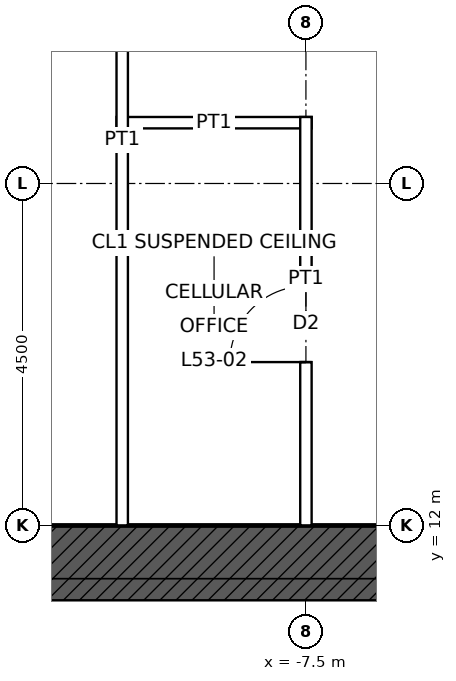
"""IFC4 building model, lengths in metres.
Left out: names, types, materials, properties, quantities, classifications, styles, units other than length and angle.
Written with IfcOpenShell. Run it as: python <this file> out.ifc"""

import sys

from ifc_helpers import new_model, si_unit, direction, frame, frame_2d, origin, place, context, subcontext, project, spatial, rectangle, extrude, element, fill, save


model = new_model("IFC4")
c1 = context("Model", 3, precision=1e-05, world=origin(), true_north=direction((0.0, 1.0)))
c2 = subcontext(c1, "Body", "Model", "MODEL_VIEW")
j1 = project(units=[si_unit("LENGTHUNIT", "METRE"), si_unit("PLANEANGLEUNIT", "RADIAN")], contexts=[c1])
p1 = place(None, origin())
s1 = spatial("IfcSite", under=j1, at=p1, CompositionType="ELEMENT")
p2 = place(p1, origin())
s2 = spatial("IfcBuilding", under=s1, at=p2, CompositionType="ELEMENT")
p3 = place(p2, frame((0.0, 0.0, 245.9)))
s3 = spatial("IfcBuildingStorey", under=s2, at=p3, CompositionType="ELEMENT", Elevation=245.9)
p4 = place(p3, frame((-12.0, 11.5, 0.0), z_axis=(0.0, 0.0, 1.0), x_axis=(1.0, 0.0, 0.0)))
e1 = element("IfcWall", 1, at=p4, inside=s3, PredefinedType="SHEAR", context=c2, shape_type="SweptSolid", body=[
    extrude(rectangle(XDim=24.0, YDim=1.0, at=frame_2d((12.0, 0.0))), origin(), (0.0, 0.0, 1.0), 4.0),
])
p5 = place(p4, frame((6.25, 0.0, 0.0)))
e2 = element("IfcOpeningElement", 2, at=p5, cuts=e1, PredefinedType="OPENING", context=c2, shape_type="SweptSolid", body=[
    extrude(rectangle(XDim=1.0, YDim=2.4, at=frame_2d((0.5, 1.2))), frame((0.0, 0.51, 0.0), z_axis=(0.0, -1.0, 0.0), x_axis=(1.0, 0.0, 0.0)), (0.0, 0.0, 1.0), 1.02),
])
p6 = place(p4, frame((16.75, 0.0, 0.0)))
e3 = element("IfcOpeningElement", 3, at=p6, cuts=e1, PredefinedType="OPENING", context=c2, shape_type="SweptSolid", body=[
    extrude(rectangle(XDim=1.0, YDim=2.4, at=frame_2d((0.5, 1.2))), frame((0.0, 0.51, 0.0), z_axis=(0.0, -1.0, 0.0), x_axis=(1.0, 0.0, 0.0)), (0.0, 0.0, 1.0), 1.02),
])
p7 = place(p3, frame((-9.992, 17.3, 0.0), z_axis=(0.0, 0.0, 1.0), x_axis=(1.0, 0.0, 0.0)))
e4 = element("IfcWall", 4, at=p7, inside=s3, PredefinedType="PARTITIONING", context=c2, shape_type="SweptSolid", body=[
    extrude(rectangle(XDim=2.567, YDim=0.15, at=frame_2d((1.283, 0.0))), origin(), (0.0, 0.0, 1.0), 3.85),
])
p8 = place(p3, frame((-9.917, 12.0, 0.0), z_axis=(0.0, 0.0, 1.0), x_axis=(0.0, 1.0, 0.0)))
e5 = element("IfcWall", 5, at=p8, inside=s3, PredefinedType="PARTITIONING", context=c2, shape_type="SweptSolid", body=[
    extrude(rectangle(XDim=10.15, YDim=0.15, at=frame_2d((5.075, 0.0))), origin(), (0.0, 0.0, 1.0), 3.85),
])
p9 = place(p3, frame((-7.5, 12.0, 0.0), z_axis=(0.0, 0.0, 1.0), x_axis=(0.0, 1.0, 0.0)))
e6 = element("IfcWall", 6, at=p9, inside=s3, PredefinedType="PARTITIONING", context=c2, shape_type="SweptSolid", body=[
    extrude(rectangle(XDim=5.375, YDim=0.15, at=frame_2d((2.688, 0.0))), origin(), (0.0, 0.0, 1.0), 3.238),
])
p10 = place(p9, frame((2.15, 0.0, 0.0)))
e7 = element("IfcOpeningElement", 7, at=p10, cuts=e6, PredefinedType="OPENING", context=c2, shape_type="SweptSolid", body=[
    extrude(rectangle(XDim=1.0, YDim=2.1, at=frame_2d((0.5, 1.05))), frame((0.0, 0.085, 0.0), z_axis=(0.0, -1.0, 0.0), x_axis=(1.0, 0.0, 0.0)), (0.0, 0.0, 1.0), 0.17),
])
p11 = place(p10, origin())
e8 = element("IfcDoor", 8, at=p11, inside=s3, OperationType="SINGLE_SWING_LEFT", PredefinedType="DOOR", context=c2, shape_type="SweptSolid", body=[
    extrude(rectangle(XDim=1.0, YDim=2.1, at=frame_2d((0.5, 1.05))), frame((0.0, 0.025, 0.0), z_axis=(0.0, -1.0, 0.0), x_axis=(1.0, 0.0, 0.0)), (0.0, 0.0, 1.0), 0.05),
])
fill(e7, e8)
save(model, sys.argv[1])
